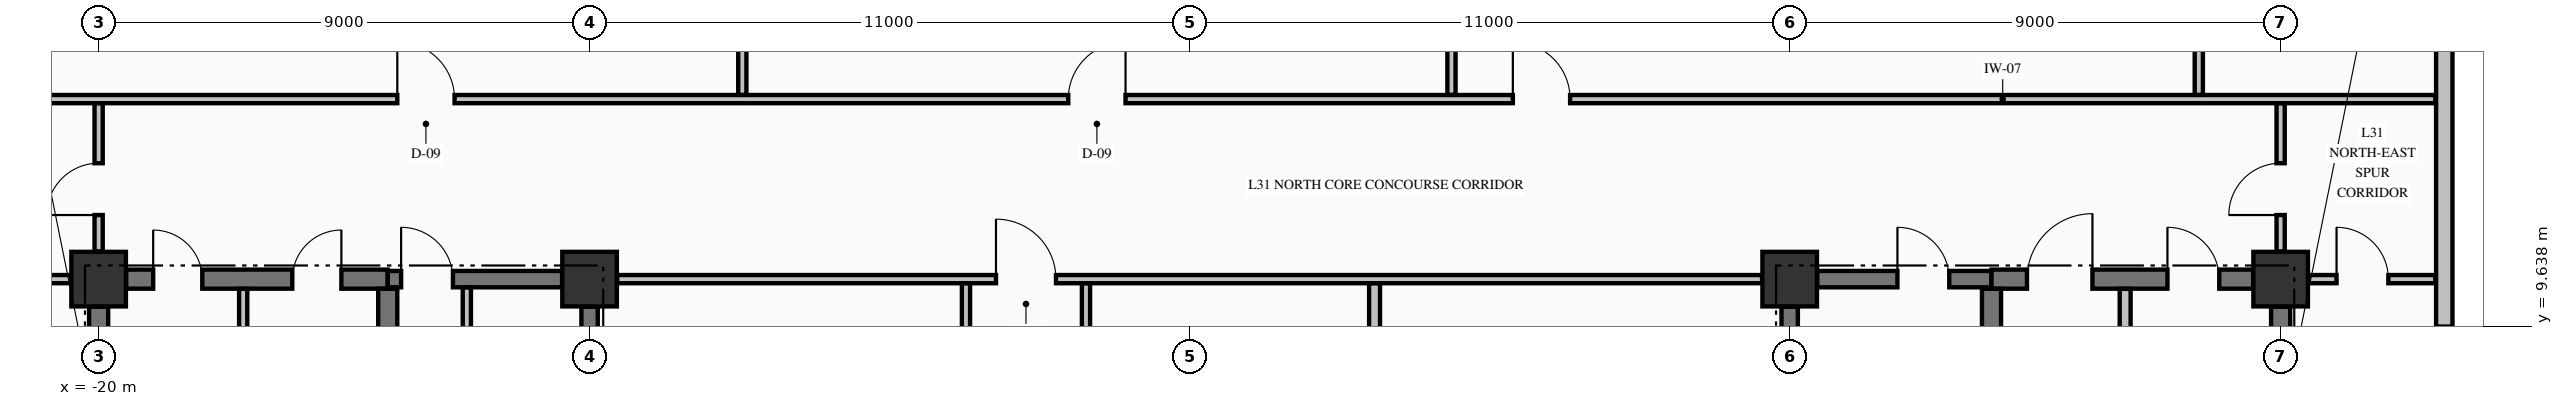
"""IFC4 building model, lengths in metres.
Left out: names, types, materials, properties, quantities, classifications, styles, units other than length and angle.
Written with IfcOpenShell. Run it as: python <this file> out.ifc"""

import sys

from ifc_helpers import new_model, si_unit, direction, frame, frame_2d, origin, origin_2d, place, context, subcontext, project, spatial, rectangle, extrude, element, fill, save


model = new_model("IFC4")
c1 = context("Model", 3, precision=1e-05, world=origin(), true_north=direction((0.0, 1.0)))
c2 = subcontext(c1, "Body", "Model", "MODEL_VIEW")
j1 = project(units=[si_unit("LENGTHUNIT", "METRE"), si_unit("PLANEANGLEUNIT", "RADIAN")], contexts=[c1])
p1 = place(None, origin())
s1 = spatial("IfcSite", under=j1, at=p1, CompositionType="ELEMENT")
p2 = place(p1, origin())
s2 = spatial("IfcBuilding", under=s1, at=p2, CompositionType="ELEMENT")
p3 = place(p2, frame((0.0, 0.0, 124.92)))
s3 = spatial("IfcBuildingStorey", under=s2, at=p3, CompositionType="ELEMENT", Elevation=124.92)
for number, where, z_axis, x_axis in (
    (1, (-20.0, 10.5, -0.25), (0.0, 0.0, 1.0), (1.0, 0.0, 0.0)),
    (2, (-11.0, 10.5, -0.25), (0.0, 0.0, 1.0), (1.0, 0.0, 0.0)),
    (3, (11.0, 10.5, -0.25), (0.0, 0.0, 1.0), (1.0, 0.0, 0.0)),
    (4, (20.0, 10.5, -0.25), (0.0, 0.0, 1.0), (1.0, 0.0, 0.0)),
):
    element("IfcColumn", number, at=place(p3, frame(where, z_axis=z_axis, x_axis=x_axis)), inside=s3, PredefinedType="COLUMN", context=c2, shape_type="SweptSolid", body=[
        extrude(rectangle(XDim=1.0, YDim=1.0, at=origin_2d()), origin(), (0.0, 0.0, 1.0), 3.57),
    ])
p4 = place(p3, frame((23.0, 9.63, 0.0), z_axis=(0.0, 0.0, 1.0), x_axis=(0.0, 1.0, 0.0)))
e5 = element("IfcWall", 5, at=p4, inside=s3, PredefinedType="STANDARD", context=c2, shape_type="SweptSolid", body=[
    extrude(rectangle(XDim=10.74, YDim=0.3, at=frame_2d((5.37, 0.0))), origin(), (0.0, 0.0, 1.0), 2.712),
])
p5 = place(p3, frame((-19.496, 10.5, 0.0), z_axis=(0.0, 0.0, 1.0), x_axis=(1.0, 0.0, 0.0)))
e6 = element("IfcWall", 6, at=p5, inside=s3, PredefinedType="SHEAR", context=c2, shape_type="SweptSolid", body=[
    extrude(rectangle(XDim=4.796, YDim=0.35, at=frame_2d((2.398, 0.0))), origin(), (0.0, 0.0, 1.0), 3.32),
])
p6 = place(p5, frame((0.496, 0.0, 0.0)))
e7 = element("IfcOpeningElement", 7, at=p6, cuts=e6, PredefinedType="OPENING", context=c2, shape_type="SweptSolid", body=[
    extrude(rectangle(XDim=0.9, YDim=2.15, at=frame_2d((0.45, 1.075))), frame((0.0, 0.185, 0.0), z_axis=(0.0, -1.0, 0.0), x_axis=(1.0, 0.0, 0.0)), (0.0, 0.0, 1.0), 0.37),
])
p7 = place(p5, frame((3.046, 0.0, 0.0)))
e8 = element("IfcOpeningElement", 8, at=p7, cuts=e6, PredefinedType="OPENING", context=c2, shape_type="SweptSolid", body=[
    extrude(rectangle(XDim=0.9, YDim=2.15, at=frame_2d((0.45, 1.075))), frame((0.0, 0.185, 0.0), z_axis=(0.0, -1.0, 0.0), x_axis=(1.0, 0.0, 0.0)), (0.0, 0.0, 1.0), 0.37),
])
p8 = place(p3, frame((-14.7, 10.5, 0.0), z_axis=(0.0, 0.0, 1.0), x_axis=(1.0, 0.0, 0.0)))
e9 = element("IfcWall", 9, at=p8, inside=s3, PredefinedType="SHEAR", context=c2, shape_type="SweptSolid", body=[
    extrude(rectangle(XDim=3.196, YDim=0.3, at=frame_2d((1.598, 0.0))), origin(), (0.0, 0.0, 1.0), 3.32),
])
p9 = place(p8, frame((0.245, 0.0, 0.0)))
e10 = element("IfcOpeningElement", 10, at=p9, cuts=e9, PredefinedType="OPENING", context=c2, shape_type="SweptSolid", body=[
    extrude(rectangle(XDim=0.95, YDim=2.15, at=frame_2d((0.475, 1.075))), frame((0.0, 0.16, 0.0), z_axis=(0.0, -1.0, 0.0), x_axis=(1.0, 0.0, 0.0)), (0.0, 0.0, 1.0), 0.32),
])
p10 = place(p3, frame((11.504, 10.5, 0.0), z_axis=(0.0, 0.0, 1.0), x_axis=(1.0, 0.0, 0.0)))
e11 = element("IfcWall", 11, at=p10, inside=s3, PredefinedType="SHEAR", context=c2, shape_type="SweptSolid", body=[
    extrude(rectangle(XDim=3.196, YDim=0.3, at=frame_2d((1.598, 0.0))), origin(), (0.0, 0.0, 1.0), 3.32),
])
p11 = place(p10, frame((1.471, 0.0, 0.0)))
e12 = element("IfcOpeningElement", 12, at=p11, cuts=e11, PredefinedType="OPENING", context=c2, shape_type="SweptSolid", body=[
    extrude(rectangle(XDim=0.95, YDim=2.15, at=frame_2d((0.475, 1.075))), frame((0.0, 0.16, 0.0), z_axis=(0.0, -1.0, 0.0), x_axis=(1.0, 0.0, 0.0)), (0.0, 0.0, 1.0), 0.32),
])
p12 = place(p3, frame((14.7, 10.5, 0.0), z_axis=(0.0, 0.0, 1.0), x_axis=(1.0, 0.0, 0.0)))
e13 = element("IfcWall", 13, at=p12, inside=s3, PredefinedType="SHEAR", context=c2, shape_type="SweptSolid", body=[
    extrude(rectangle(XDim=4.796, YDim=0.35, at=frame_2d((2.398, 0.0))), origin(), (0.0, 0.0, 1.0), 3.32),
])
p13 = place(p12, frame((0.65, 0.0, 0.0)))
e14 = element("IfcOpeningElement", 14, at=p13, cuts=e13, PredefinedType="OPENING", context=c2, shape_type="SweptSolid", body=[
    extrude(rectangle(XDim=1.2, YDim=2.15, at=frame_2d((0.6, 1.075))), frame((0.0, 0.185, 0.0), z_axis=(0.0, -1.0, 0.0), x_axis=(1.0, 0.0, 0.0)), (0.0, 0.0, 1.0), 0.37),
])
p14 = place(p12, frame((3.225, 0.0, 0.0)))
e15 = element("IfcOpeningElement", 15, at=p14, cuts=e13, PredefinedType="OPENING", context=c2, shape_type="SweptSolid", body=[
    extrude(rectangle(XDim=0.95, YDim=2.15, at=frame_2d((0.475, 1.075))), frame((0.0, 0.185, 0.0), z_axis=(0.0, -1.0, 0.0), x_axis=(1.0, 0.0, 0.0)), (0.0, 0.0, 1.0), 0.37),
])
p15 = place(p3, frame((-27.835, 10.5, 0.0), z_axis=(0.0, 0.0, 1.0), x_axis=(1.0, 0.0, 0.0)))
e16 = element("IfcWall", 16, at=p15, inside=s3, PredefinedType="PARTITIONING", context=c2, shape_type="SweptSolid", body=[
    extrude(rectangle(XDim=7.329, YDim=0.15, at=frame_2d((3.665, 0.0))), origin(), (0.0, 0.0, 1.0), 3.32),
])
p16 = place(p15, frame((3.335, 0.0, 0.0)))
e17 = element("IfcOpeningElement", 17, at=p16, cuts=e16, PredefinedType="OPENING", context=c2, shape_type="SweptSolid", body=[
    extrude(rectangle(XDim=1.0, YDim=2.15, at=frame_2d((0.5, 1.075))), frame((0.0, 0.085, 0.0), z_axis=(0.0, -1.0, 0.0), x_axis=(1.0, 0.0, 0.0)), (0.0, 0.0, 1.0), 0.17),
])
p17 = place(p3, frame((-10.494, 10.5, 0.0), z_axis=(0.0, 0.0, 1.0), x_axis=(1.0, 0.0, 0.0)))
e18 = element("IfcWall", 18, at=p17, inside=s3, PredefinedType="PARTITIONING", context=c2, shape_type="SweptSolid", body=[
    extrude(rectangle(XDim=20.988, YDim=0.15, at=frame_2d((10.494, 0.0))), origin(), (0.0, 0.0, 1.0), 3.32),
])
p18 = place(p17, frame((6.944, 0.0, 0.0)))
e19 = element("IfcOpeningElement", 19, at=p18, cuts=e18, PredefinedType="OPENING", context=c2, shape_type="SweptSolid", body=[
    extrude(rectangle(XDim=1.1, YDim=2.15, at=frame_2d((0.55, 1.075))), frame((0.0, 0.085, 0.0), z_axis=(0.0, -1.0, 0.0), x_axis=(1.0, 0.0, 0.0)), (0.0, 0.0, 1.0), 0.17),
])
p19 = place(p3, frame((20.506, 10.5, 0.0), z_axis=(0.0, 0.0, 1.0), x_axis=(1.0, 0.0, 0.0)))
e20 = element("IfcWall", 20, at=p19, inside=s3, PredefinedType="PARTITIONING", context=c2, shape_type="SweptSolid", body=[
    extrude(rectangle(XDim=2.329, YDim=0.15, at=frame_2d((1.165, 0.0))), origin(), (0.0, 0.0, 1.0), 3.32),
])
p20 = place(p19, frame((0.519, 0.0, 0.0)))
e21 = element("IfcOpeningElement", 21, at=p20, cuts=e20, PredefinedType="OPENING", context=c2, shape_type="SweptSolid", body=[
    extrude(rectangle(XDim=0.95, YDim=2.15, at=frame_2d((0.475, 1.075))), frame((0.0, 0.085, 0.0), z_axis=(0.0, -1.0, 0.0), x_axis=(1.0, 0.0, 0.0)), (0.0, 0.0, 1.0), 0.17),
])
p21 = place(p3, frame((-27.835, 13.8, 0.0), z_axis=(0.0, 0.0, 1.0), x_axis=(1.0, 0.0, 0.0)))
e22 = element("IfcWall", 22, at=p21, inside=s3, PredefinedType="PARTITIONING", context=c2, shape_type="SweptSolid", body=[
    extrude(rectangle(XDim=50.67, YDim=0.15, at=frame_2d((25.335, 0.0))), origin(), (0.0, 0.0, 1.0), 3.32),
])
p22 = place(p21, frame((13.31, 0.0, 0.0)))
e23 = element("IfcOpeningElement", 23, at=p22, cuts=e22, PredefinedType="OPENING", context=c2, shape_type="SweptSolid", body=[
    extrude(rectangle(XDim=1.05, YDim=2.15, at=frame_2d((0.525, 1.075))), frame((0.0, 0.085, 0.0), z_axis=(0.0, -1.0, 0.0), x_axis=(1.0, 0.0, 0.0)), (0.0, 0.0, 1.0), 0.17),
])
p23 = place(p21, frame((25.61, 0.0, 0.0)))
e24 = element("IfcOpeningElement", 24, at=p23, cuts=e22, PredefinedType="OPENING", context=c2, shape_type="SweptSolid", body=[
    extrude(rectangle(XDim=1.05, YDim=2.15, at=frame_2d((0.525, 1.075))), frame((0.0, 0.085, 0.0), z_axis=(0.0, -1.0, 0.0), x_axis=(1.0, 0.0, 0.0)), (0.0, 0.0, 1.0), 0.17),
])
p24 = place(p21, frame((33.76, 0.0, 0.0)))
e25 = element("IfcOpeningElement", 25, at=p24, cuts=e22, PredefinedType="OPENING", context=c2, shape_type="SweptSolid", body=[
    extrude(rectangle(XDim=1.05, YDim=2.15, at=frame_2d((0.525, 1.075))), frame((0.0, 0.085, 0.0), z_axis=(0.0, -1.0, 0.0), x_axis=(1.0, 0.0, 0.0)), (0.0, 0.0, 1.0), 0.17),
])
p25 = place(p3, frame((-20.0, 0.504, 0.0), z_axis=(0.0, 0.0, 1.0), x_axis=(0.0, 1.0, 0.0)))
e26 = element("IfcWall", 26, at=p25, inside=s3, PredefinedType="SHEAR", context=c2, shape_type="SweptSolid", body=[
    extrude(rectangle(XDim=9.492, YDim=0.35, at=frame_2d((4.746, 0.0))), origin(), (0.0, 0.0, 1.0), 3.32),
])
p26 = place(p3, frame((-14.7, 5.852, 0.0), z_axis=(0.0, 0.0, 1.0), x_axis=(0.0, 1.0, 0.0)))
e27 = element("IfcWall", 27, at=p26, inside=s3, PredefinedType="SHEAR", context=c2, shape_type="SweptSolid", body=[
    extrude(rectangle(XDim=4.471, YDim=0.35, at=frame_2d((2.235, 0.0))), origin(), (0.0, 0.0, 1.0), 3.32),
])
for number, where, z_axis, x_axis in (
    (28, (-11.0, 5.852, 0.0), (0.0, 0.0, 1.0), (0.0, 1.0, 0.0)),
    (29, (11.0, 5.852, 0.0), (0.0, 0.0, 1.0), (0.0, 1.0, 0.0)),
):
    element("IfcWall", number, at=place(p3, frame(where, z_axis=z_axis, x_axis=x_axis)), inside=s3, PredefinedType="SHEAR", context=c2, shape_type="SweptSolid", body=[
        extrude(rectangle(XDim=4.144, YDim=0.3, at=frame_2d((2.072, 0.0))), origin(), (0.0, 0.0, 1.0), 3.32),
    ])
p27 = place(p3, frame((14.7, 5.852, 0.0), z_axis=(0.0, 0.0, 1.0), x_axis=(0.0, 1.0, 0.0)))
e30 = element("IfcWall", 30, at=p27, inside=s3, PredefinedType="SHEAR", context=c2, shape_type="SweptSolid", body=[
    extrude(rectangle(XDim=4.471, YDim=0.35, at=frame_2d((2.235, 0.0))), origin(), (0.0, 0.0, 1.0), 3.32),
])
p28 = place(p3, frame((20.0, 5.377, 0.0), z_axis=(0.0, 0.0, 1.0), x_axis=(0.0, 1.0, 0.0)))
e31 = element("IfcWall", 31, at=p28, inside=s3, PredefinedType="SHEAR", context=c2, shape_type="SweptSolid", body=[
    extrude(rectangle(XDim=4.619, YDim=0.35, at=frame_2d((2.31, 0.0))), origin(), (0.0, 0.0, 1.0), 3.32),
])
p29 = place(p3, frame((-20.0, 11.006, 0.0), z_axis=(0.0, 0.0, 1.0), x_axis=(0.0, 1.0, 0.0)))
e32 = element("IfcWall", 32, at=p29, inside=s3, PredefinedType="PARTITIONING", context=c2, shape_type="SweptSolid", body=[
    extrude(rectangle(XDim=2.716, YDim=0.15, at=frame_2d((1.358, 0.0))), origin(), (0.0, 0.0, 1.0), 2.81),
])
p30 = place(p29, frame((0.669, 0.0, 0.0)))
e33 = element("IfcOpeningElement", 33, at=p30, cuts=e32, PredefinedType="OPENING", context=c2, shape_type="SweptSolid", body=[
    extrude(rectangle(XDim=0.95, YDim=2.15, at=frame_2d((0.475, 1.075))), frame((0.0, 0.085, 0.0), z_axis=(0.0, -1.0, 0.0), x_axis=(1.0, 0.0, 0.0)), (0.0, 0.0, 1.0), 0.17),
])
p31 = place(p3, frame((-17.35, -0.097, 0.0), z_axis=(0.0, 0.0, 1.0), x_axis=(0.0, 1.0, 0.0)))
e34 = element("IfcWall", 34, at=p31, inside=s3, PredefinedType="PARTITIONING", context=c2, shape_type="SweptSolid", body=[
    extrude(rectangle(XDim=10.419, YDim=0.15, at=frame_2d((5.209, 0.0))), origin(), (0.0, 0.0, 1.0), 3.32),
])
p32 = place(p3, frame((-13.25, 5.853, 0.0), z_axis=(0.0, 0.0, 1.0), x_axis=(0.0, 1.0, 0.0)))
e35 = element("IfcWall", 35, at=p32, inside=s3, PredefinedType="PARTITIONING", context=c2, shape_type="SweptSolid", body=[
    extrude(rectangle(XDim=4.494, YDim=0.15, at=frame_2d((2.247, 0.0))), origin(), (0.0, 0.0, 1.0), 3.32),
])
p33 = place(p32, frame((1.472, 0.0, 0.0)))
e36 = element("IfcOpeningElement", 36, at=p33, cuts=e35, PredefinedType="OPENING", context=c2, shape_type="SweptSolid", body=[
    extrude(rectangle(XDim=0.95, YDim=2.15, at=frame_2d((0.475, 1.075))), frame((0.0, 0.085, 0.0), z_axis=(0.0, -1.0, 0.0), x_axis=(1.0, 0.0, 0.0)), (0.0, 0.0, 1.0), 0.17),
])
p34 = place(p3, frame((-8.2, 13.878, 0.0), z_axis=(0.0, 0.0, 1.0), x_axis=(0.0, 1.0, 0.0)))
e37 = element("IfcWall", 37, at=p34, inside=s3, PredefinedType="PARTITIONING", context=c2, shape_type="SweptSolid", body=[
    extrude(rectangle(XDim=11.457, YDim=0.15, at=frame_2d((5.729, 0.0))), origin(), (0.0, 0.0, 1.0), 3.32),
])
for number, where, z_axis, x_axis in (
    (38, (-4.1, 2.978, 0.0), (0.0, 0.0, 1.0), (0.0, 1.0, 0.0)),
    (39, (-1.9, 2.978, 0.0), (0.0, 0.0, 1.0), (0.0, 1.0, 0.0)),
):
    element("IfcWall", number, at=place(p3, frame(where, z_axis=z_axis, x_axis=x_axis)), inside=s3, PredefinedType="PARTITIONING", context=c2, shape_type="SweptSolid", body=[
        extrude(rectangle(XDim=7.444, YDim=0.15, at=frame_2d((3.722, 0.0))), origin(), (0.0, 0.0, 1.0), 3.32),
    ])
p35 = place(p3, frame((3.39, 2.978, 0.0), z_axis=(0.0, 0.0, 1.0), x_axis=(0.0, 1.0, 0.0)))
e40 = element("IfcWall", 40, at=p35, inside=s3, PredefinedType="PARTITIONING", context=c2, shape_type="SweptSolid", body=[
    extrude(rectangle(XDim=7.444, YDim=0.2, at=frame_2d((3.722, 0.0))), origin(), (0.0, 0.0, 1.0), 3.32),
])
p36 = place(p3, frame((4.8, 13.878, 0.0), z_axis=(0.0, 0.0, 1.0), x_axis=(0.0, 1.0, 0.0)))
e41 = element("IfcWall", 41, at=p36, inside=s3, PredefinedType="PARTITIONING", context=c2, shape_type="SweptSolid", body=[
    extrude(rectangle(XDim=11.457, YDim=0.15, at=frame_2d((5.729, 0.0))), origin(), (0.0, 0.0, 1.0), 3.32),
])
p37 = place(p3, frame((17.15, 7.928, 0.0), z_axis=(0.0, 0.0, 1.0), x_axis=(0.0, 1.0, 0.0)))
e42 = element("IfcWall", 42, at=p37, inside=s3, PredefinedType="PARTITIONING", context=c2, shape_type="SweptSolid", body=[
    extrude(rectangle(XDim=2.394, YDim=0.2, at=frame_2d((1.197, 0.0))), origin(), (0.0, 0.0, 1.0), 3.32),
])
p38 = place(p3, frame((18.5, 13.878, 0.0), z_axis=(0.0, 0.0, 1.0), x_axis=(0.0, 1.0, 0.0)))
e43 = element("IfcWall", 43, at=p38, inside=s3, PredefinedType="PARTITIONING", context=c2, shape_type="SweptSolid", body=[
    extrude(rectangle(XDim=6.516, YDim=0.15, at=frame_2d((3.258, 0.0))), origin(), (0.0, 0.0, 1.0), 3.32),
])
p39 = place(p3, frame((20.0, 11.006, 0.0), z_axis=(0.0, 0.0, 1.0), x_axis=(0.0, 1.0, 0.0)))
e44 = element("IfcWall", 44, at=p39, inside=s3, PredefinedType="PARTITIONING", context=c2, shape_type="SweptSolid", body=[
    extrude(rectangle(XDim=2.716, YDim=0.15, at=frame_2d((1.358, 0.0))), origin(), (0.0, 0.0, 1.0), 2.81),
])
p40 = place(p39, frame((0.669, 0.0, 0.0)))
e45 = element("IfcOpeningElement", 45, at=p40, cuts=e44, PredefinedType="OPENING", context=c2, shape_type="SweptSolid", body=[
    extrude(rectangle(XDim=0.95, YDim=2.15, at=frame_2d((0.475, 1.075))), frame((0.0, 0.085, 0.0), z_axis=(0.0, -1.0, 0.0), x_axis=(1.0, 0.0, 0.0)), (0.0, 0.0, 1.0), 0.17),
])
p41 = place(p9, origin())
e46 = element("IfcDoor", 46, at=p41, inside=s3, OperationType="SINGLE_SWING_LEFT", PredefinedType="DOOR", context=c2, shape_type="SweptSolid", body=[
    extrude(rectangle(XDim=0.95, YDim=2.15, at=frame_2d((0.475, 1.075))), frame((0.0, 0.025, 0.0), z_axis=(0.0, -1.0, 0.0), x_axis=(1.0, 0.0, 0.0)), (0.0, 0.0, 1.0), 0.05),
])
fill(e10, e46)
p42 = place(p11, origin())
e47 = element("IfcDoor", 47, at=p42, inside=s3, OperationType="SINGLE_SWING_LEFT", PredefinedType="DOOR", context=c2, shape_type="SweptSolid", body=[
    extrude(rectangle(XDim=0.95, YDim=2.15, at=frame_2d((0.475, 1.075))), frame((0.0, 0.025, 0.0), z_axis=(0.0, -1.0, 0.0), x_axis=(1.0, 0.0, 0.0)), (0.0, 0.0, 1.0), 0.05),
])
fill(e12, e47)
p43 = place(p6, origin())
e48 = element("IfcDoor", 48, at=p43, inside=s3, OperationType="SINGLE_SWING_LEFT", PredefinedType="DOOR", context=c2, shape_type="SweptSolid", body=[
    extrude(rectangle(XDim=0.9, YDim=2.15, at=frame_2d((0.45, 1.075))), frame((0.0, 0.025, 0.0), z_axis=(0.0, -1.0, 0.0), x_axis=(1.0, 0.0, 0.0)), (0.0, 0.0, 1.0), 0.05),
])
fill(e7, e48)
p44 = place(p7, origin())
e49 = element("IfcDoor", 49, at=p44, inside=s3, OperationType="SINGLE_SWING_RIGHT", PredefinedType="DOOR", context=c2, shape_type="SweptSolid", body=[
    extrude(rectangle(XDim=0.9, YDim=2.15, at=frame_2d((0.45, 1.075))), frame((0.0, 0.025, 0.0), z_axis=(0.0, -1.0, 0.0), x_axis=(1.0, 0.0, 0.0)), (0.0, 0.0, 1.0), 0.05),
])
fill(e8, e49)
p45 = place(p13, origin())
e50 = element("IfcDoor", 50, at=p45, inside=s3, OperationType="SINGLE_SWING_RIGHT", PredefinedType="DOOR", context=c2, shape_type="SweptSolid", body=[
    extrude(rectangle(XDim=1.2, YDim=2.15, at=frame_2d((0.6, 1.075))), frame((0.0, 0.025, 0.0), z_axis=(0.0, -1.0, 0.0), x_axis=(1.0, 0.0, 0.0)), (0.0, 0.0, 1.0), 0.05),
])
fill(e14, e50)
p46 = place(p14, origin())
e51 = element("IfcDoor", 51, at=p46, inside=s3, OperationType="SINGLE_SWING_LEFT", PredefinedType="DOOR", context=c2, shape_type="SweptSolid", body=[
    extrude(rectangle(XDim=0.95, YDim=2.15, at=frame_2d((0.475, 1.075))), frame((0.0, 0.025, 0.0), z_axis=(0.0, -1.0, 0.0), x_axis=(1.0, 0.0, 0.0)), (0.0, 0.0, 1.0), 0.05),
])
fill(e15, e51)
p47 = place(p18, origin())
e52 = element("IfcDoor", 52, at=p47, inside=s3, OperationType="SINGLE_SWING_LEFT", PredefinedType="DOOR", context=c2, shape_type="SweptSolid", body=[
    extrude(rectangle(XDim=1.1, YDim=2.15, at=frame_2d((0.55, 1.075))), frame((0.0, 0.025, 0.0), z_axis=(0.0, -1.0, 0.0), x_axis=(1.0, 0.0, 0.0)), (0.0, 0.0, 1.0), 0.05),
])
fill(e19, e52)
p48 = place(p22, origin())
e53 = element("IfcDoor", 53, at=p48, inside=s3, OperationType="SINGLE_SWING_LEFT", PredefinedType="DOOR", context=c2, shape_type="SweptSolid", body=[
    extrude(rectangle(XDim=1.05, YDim=2.15, at=frame_2d((0.525, 1.075))), frame((0.0, 0.025, 0.0), z_axis=(0.0, -1.0, 0.0), x_axis=(1.0, 0.0, 0.0)), (0.0, 0.0, 1.0), 0.05),
])
fill(e23, e53)
p49 = place(p23, origin())
e54 = element("IfcDoor", 54, at=p49, inside=s3, OperationType="SINGLE_SWING_RIGHT", PredefinedType="DOOR", context=c2, shape_type="SweptSolid", body=[
    extrude(rectangle(XDim=1.05, YDim=2.15, at=frame_2d((0.525, 1.075))), frame((0.0, 0.025, 0.0), z_axis=(0.0, -1.0, 0.0), x_axis=(1.0, 0.0, 0.0)), (0.0, 0.0, 1.0), 0.05),
])
fill(e24, e54)
p50 = place(p24, origin())
e55 = element("IfcDoor", 55, at=p50, inside=s3, OperationType="SINGLE_SWING_LEFT", PredefinedType="DOOR", context=c2, shape_type="SweptSolid", body=[
    extrude(rectangle(XDim=1.05, YDim=2.15, at=frame_2d((0.525, 1.075))), frame((0.0, 0.025, 0.0), z_axis=(0.0, -1.0, 0.0), x_axis=(1.0, 0.0, 0.0)), (0.0, 0.0, 1.0), 0.05),
])
fill(e25, e55)
p51 = place(p30, origin())
e56 = element("IfcDoor", 56, at=p51, inside=s3, OperationType="SINGLE_SWING_LEFT", PredefinedType="DOOR", context=c2, shape_type="SweptSolid", body=[
    extrude(rectangle(XDim=0.95, YDim=2.15, at=frame_2d((0.475, 1.075))), frame((0.0, 0.025, 0.0), z_axis=(0.0, -1.0, 0.0), x_axis=(1.0, 0.0, 0.0)), (0.0, 0.0, 1.0), 0.05),
])
fill(e33, e56)
p52 = place(p40, origin())
e57 = element("IfcDoor", 57, at=p52, inside=s3, OperationType="SINGLE_SWING_LEFT", PredefinedType="DOOR", context=c2, shape_type="SweptSolid", body=[
    extrude(rectangle(XDim=0.95, YDim=2.15, at=frame_2d((0.475, 1.075))), frame((0.0, 0.025, 0.0), z_axis=(0.0, -1.0, 0.0), x_axis=(1.0, 0.0, 0.0)), (0.0, 0.0, 1.0), 0.05),
])
fill(e45, e57)
p53 = place(p20, origin())
e58 = element("IfcDoor", 58, at=p53, inside=s3, OperationType="SINGLE_SWING_LEFT", PredefinedType="DOOR", context=c2, shape_type="SweptSolid", body=[
    extrude(rectangle(XDim=0.95, YDim=2.15, at=frame_2d((0.475, 1.075))), frame((0.0, 0.025, 0.0), z_axis=(0.0, -1.0, 0.0), x_axis=(1.0, 0.0, 0.0)), (0.0, 0.0, 1.0), 0.05),
])
fill(e21, e58)
save(model, sys.argv[1])
